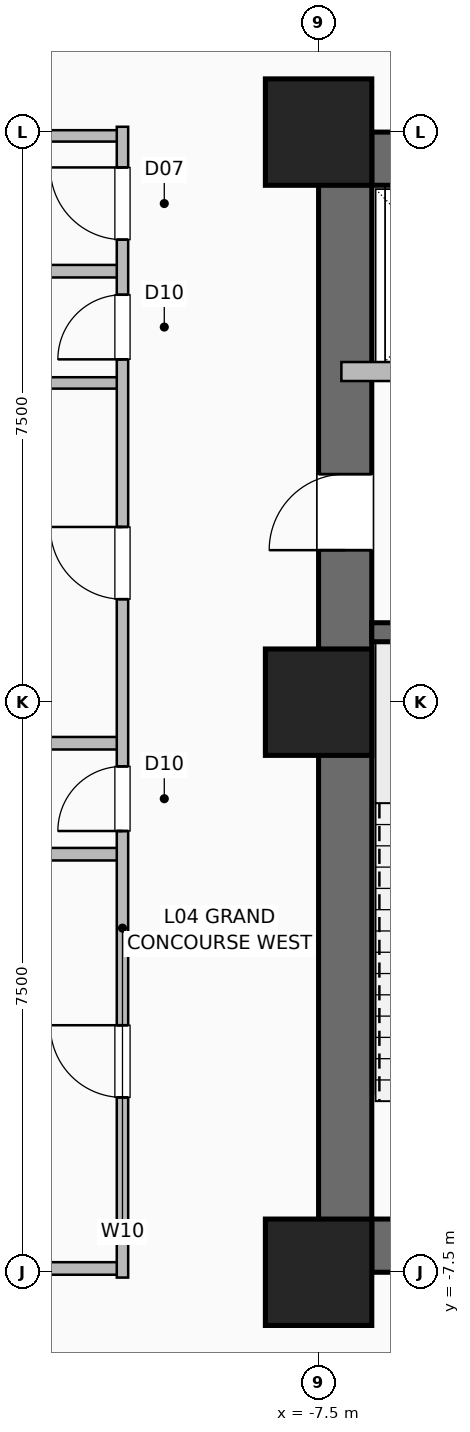
"""IFC4 building model, lengths in metres.
Left out: names, types, materials, properties, quantities, classifications, styles, units other than length and angle.
Written with IfcOpenShell. Run it as: python <this file> out.ifc"""

import sys

from ifc_helpers import new_model, si_unit, direction, frame, frame_2d, origin, origin_2d, place, context, subcontext, project, spatial, rectangle, hollow_rectangle, extrude, element, fill, save


model = new_model("IFC4")
c1 = context("Model", 3, precision=1e-05, world=origin(), true_north=direction((0.0, 1.0)))
c2 = subcontext(c1, "Body", "Model", "MODEL_VIEW")
j1 = project(units=[si_unit("LENGTHUNIT", "METRE"), si_unit("PLANEANGLEUNIT", "RADIAN")], contexts=[c1])
p1 = place(None, origin())
s1 = spatial("IfcSite", under=j1, at=p1, CompositionType="ELEMENT")
p2 = place(p1, origin())
s2 = spatial("IfcBuilding", under=s1, at=p2, CompositionType="ELEMENT")
p3 = place(p2, frame((0.0, 0.0, 21.6)))
s3 = spatial("IfcBuildingStorey", under=s2, at=p3, CompositionType="ELEMENT", Elevation=21.6)
for number, where, z_axis, x_axis in (
    (1, (-7.5, -7.5, 0.0), (0.0, 0.0, 1.0), (1.0, 0.0, 0.0)),
    (2, (-7.5, 7.5, 0.0), (0.0, 0.0, 1.0), (1.0, 0.0, 0.0)),
    (3, (-7.5, 0.0, 0.0), (0.0, 0.0, 1.0), (1.0, 0.0, 0.0)),
):
    element("IfcColumn", number, at=place(p3, frame(where, z_axis=z_axis, x_axis=x_axis)), inside=s3, PredefinedType="COLUMN", context=c2, shape_type="SweptSolid", body=[
        extrude(hollow_rectangle(XDim=1.4, YDim=1.4, WallThickness=0.06, at=origin_2d()), origin(), (0.0, 0.0, 1.0), 5.4),
    ])
p4 = place(p3, frame((-7.5, -7.15, 0.0), z_axis=(0.0, 0.0, 1.0), x_axis=(1.0, 0.0, 0.0)))
e4 = element("IfcWall", 4, at=p4, inside=s3, PredefinedType="SHEAR", context=c2, shape_type="SweptSolid", body=[
    extrude(rectangle(XDim=15.0, YDim=0.7, at=frame_2d((7.5, 0.0))), origin(), (0.0, 0.0, 1.0), 5.0),
])
p5 = place(p4, frame((1.55, 0.0, 0.0)))
e5 = element("IfcOpeningElement", 5, at=p5, cuts=e4, PredefinedType="OPENING", context=c2, shape_type="SweptSolid", body=[
    extrude(rectangle(XDim=1.05, YDim=2.08, at=frame_2d((0.525, 1.04))), frame((0.0, 0.36, 0.0), z_axis=(0.0, -1.0, 0.0), x_axis=(1.0, 0.0, 0.0)), (0.0, 0.0, 1.0), 0.72),
])
p6 = place(p4, frame((12.4, 0.0, 0.0)))
e6 = element("IfcOpeningElement", 6, at=p6, cuts=e4, PredefinedType="OPENING", context=c2, shape_type="SweptSolid", body=[
    extrude(rectangle(XDim=1.05, YDim=2.08, at=frame_2d((0.525, 1.04))), frame((0.0, 0.36, 0.0), z_axis=(0.0, -1.0, 0.0), x_axis=(1.0, 0.0, 0.0)), (0.0, 0.0, 1.0), 0.72),
])
p7 = place(p4, frame((4.64, 0.0, 0.0)))
e7 = element("IfcOpeningElement", 7, at=p7, cuts=e4, PredefinedType="OPENING", context=c2, shape_type="SweptSolid", body=[
    extrude(rectangle(XDim=1.1, YDim=2.2, at=frame_2d((0.55, 1.1))), frame((0.0, 0.36, 0.0), z_axis=(0.0, -1.0, 0.0), x_axis=(1.0, 0.0, 0.0)), (0.0, 0.0, 1.0), 0.72),
])
p8 = place(p4, frame((6.52, 0.0, 0.0)))
e8 = element("IfcOpeningElement", 8, at=p8, cuts=e4, PredefinedType="OPENING", context=c2, shape_type="SweptSolid", body=[
    extrude(rectangle(XDim=1.1, YDim=2.2, at=frame_2d((0.55, 1.1))), frame((0.0, 0.36, 0.0), z_axis=(0.0, -1.0, 0.0), x_axis=(1.0, 0.0, 0.0)), (0.0, 0.0, 1.0), 0.72),
])
p9 = place(p4, frame((8.4, 0.0, 0.0)))
e9 = element("IfcOpeningElement", 9, at=p9, cuts=e4, PredefinedType="OPENING", context=c2, shape_type="SweptSolid", body=[
    extrude(rectangle(XDim=1.1, YDim=2.2, at=frame_2d((0.55, 1.1))), frame((0.0, 0.36, 0.0), z_axis=(0.0, -1.0, 0.0), x_axis=(1.0, 0.0, 0.0)), (0.0, 0.0, 1.0), 0.72),
])
p10 = place(p3, frame((-7.5, 7.15, 0.0), z_axis=(0.0, 0.0, 1.0), x_axis=(1.0, 0.0, 0.0)))
e10 = element("IfcWall", 10, at=p10, inside=s3, PredefinedType="SHEAR", context=c2, shape_type="SweptSolid", body=[
    extrude(rectangle(XDim=15.0, YDim=0.7, at=frame_2d((7.5, 0.0))), origin(), (0.0, 0.0, 1.0), 5.0),
])
p11 = place(p3, frame((-7.15, -7.5, 0.0), z_axis=(0.0, 0.0, 1.0), x_axis=(0.0, 1.0, 0.0)))
e11 = element("IfcWall", 11, at=p11, inside=s3, PredefinedType="SHEAR", context=c2, shape_type="SweptSolid", body=[
    extrude(rectangle(XDim=15.0, YDim=0.7, at=frame_2d((7.5, 0.0))), origin(), (0.0, 0.0, 1.0), 5.0),
])
p12 = place(p11, frame((9.5, 0.0, 0.0)))
e12 = element("IfcOpeningElement", 12, at=p12, cuts=e11, PredefinedType="OPENING", context=c2, shape_type="SweptSolid", body=[
    extrude(rectangle(XDim=1.0, YDim=2.08, at=frame_2d((0.5, 1.04))), frame((0.0, 0.36, 0.0), z_axis=(0.0, -1.0, 0.0), x_axis=(1.0, 0.0, 0.0)), (0.0, 0.0, 1.0), 0.72),
])
p13 = place(p3, frame((-6.8, 0.92, 0.0), z_axis=(0.0, 0.0, 1.0), x_axis=(1.0, 0.0, 0.0)))
e13 = element("IfcWall", 13, at=p13, inside=s3, PredefinedType="SHEAR", context=c2, shape_type="SweptSolid", body=[
    extrude(rectangle(XDim=3.33, YDim=0.25, at=frame_2d((1.665, 0.0))), origin(), (0.0, 0.0, 1.0), 5.0),
])
p14 = place(p3, frame((-7.2, 4.35, 0.0), z_axis=(0.0, 0.0, 1.0), x_axis=(1.0, 0.0, 0.0)))
e14 = element("IfcWall", 14, at=p14, inside=s3, PredefinedType="SHEAR", context=c2, shape_type="SweptSolid", body=[
    extrude(rectangle(XDim=2.7, YDim=0.25, at=frame_2d((1.35, 0.0))), origin(), (0.0, 0.0, 1.0), 5.0),
])
p15 = place(p14, frame((0.75, 0.0, 0.0)))
e15 = element("IfcOpeningElement", 15, at=p15, cuts=e14, PredefinedType="OPENING", context=c2, shape_type="SweptSolid", body=[
    extrude(rectangle(XDim=1.2, YDim=2.2, at=frame_2d((0.6, 1.1))), frame((0.0, 0.135, 0.0), z_axis=(0.0, -1.0, 0.0), x_axis=(1.0, 0.0, 0.0)), (0.0, 0.0, 1.0), 0.27),
])
for number, where, z_axis, x_axis in (
    (16, (-22.25, -0.54, 0.0), (0.0, 0.0, 1.0), (1.0, 0.0, 0.0)),
    (17, (-22.25, 5.67, 0.0), (0.0, 0.0, 1.0), (1.0, 0.0, 0.0)),
    (18, (-22.25, -7.45, 0.0), (0.0, 0.0, 1.0), (1.0, 0.0, 0.0)),
    (19, (-22.25, -2.0, 0.0), (0.0, 0.0, 1.0), (1.0, 0.0, 0.0)),
):
    element("IfcWall", number, at=place(p3, frame(where, z_axis=z_axis, x_axis=x_axis)), inside=s3, PredefinedType="PLUMBINGWALL", context=c2, shape_type="SweptSolid", body=[
        extrude(rectangle(XDim=12.17, YDim=0.165, at=frame_2d((6.085, 0.0))), origin(), (0.0, 0.0, 1.0), 5.0),
    ])
p16 = place(p3, frame((-22.25, 4.2, 0.0), z_axis=(0.0, 0.0, 1.0), x_axis=(1.0, 0.0, 0.0)))
e20 = element("IfcWall", 20, at=p16, inside=s3, PredefinedType="PARTITIONING", context=c2, shape_type="SweptSolid", body=[
    extrude(rectangle(XDim=12.17, YDim=0.15, at=frame_2d((6.085, 0.0))), origin(), (0.0, 0.0, 1.0), 3.375),
])
p17 = place(p3, frame((-22.25, 7.45, 0.0), z_axis=(0.0, 0.0, 1.0), x_axis=(1.0, 0.0, 0.0)))
e21 = element("IfcWall", 21, at=p17, inside=s3, PredefinedType="PARTITIONING", context=c2, shape_type="SweptSolid", body=[
    extrude(rectangle(XDim=12.17, YDim=0.15, at=frame_2d((6.085, 0.0))), origin(), (0.0, 0.0, 1.0), 5.0),
])
p18 = place(p3, frame((-10.08, -7.57, 0.0), z_axis=(0.0, 0.0, 1.0), x_axis=(0.0, 1.0, 0.0)))
e22 = element("IfcWall", 22, at=p18, inside=s3, PredefinedType="PARTITIONING", context=c2, shape_type="SweptSolid", body=[
    extrude(rectangle(XDim=15.14, YDim=0.15, at=frame_2d((7.57, 0.0))), origin(), (0.0, 0.0, 1.0), 5.0),
])
p19 = place(p18, frame((2.37, 0.0, 0.0)))
e23 = element("IfcOpeningElement", 23, at=p19, cuts=e22, PredefinedType="OPENING", context=c2, shape_type="SweptSolid", body=[
    extrude(rectangle(XDim=0.95, YDim=2.06, at=frame_2d((0.475, 1.03))), frame((0.0, 0.085, 0.0), z_axis=(0.0, -1.0, 0.0), x_axis=(1.0, 0.0, 0.0)), (0.0, 0.0, 1.0), 0.17),
])
p20 = place(p18, frame((5.875, 0.0, 0.0)))
e24 = element("IfcOpeningElement", 24, at=p20, cuts=e22, PredefinedType="OPENING", context=c2, shape_type="SweptSolid", body=[
    extrude(rectangle(XDim=0.85, YDim=2.05, at=frame_2d((0.425, 1.025))), frame((0.0, 0.085, 0.0), z_axis=(0.0, -1.0, 0.0), x_axis=(1.0, 0.0, 0.0)), (0.0, 0.0, 1.0), 0.17),
])
p21 = place(p18, frame((8.925, 0.0, 0.0)))
e25 = element("IfcOpeningElement", 25, at=p21, cuts=e22, PredefinedType="OPENING", context=c2, shape_type="SweptSolid", body=[
    extrude(rectangle(XDim=0.95, YDim=2.06, at=frame_2d((0.475, 1.03))), frame((0.0, 0.085, 0.0), z_axis=(0.0, -1.0, 0.0), x_axis=(1.0, 0.0, 0.0)), (0.0, 0.0, 1.0), 0.17),
])
p22 = place(p18, frame((12.08, 0.0, 0.0)))
e26 = element("IfcOpeningElement", 26, at=p22, cuts=e22, PredefinedType="OPENING", context=c2, shape_type="SweptSolid", body=[
    extrude(rectangle(XDim=0.85, YDim=2.05, at=frame_2d((0.425, 1.025))), frame((0.0, 0.085, 0.0), z_axis=(0.0, -1.0, 0.0), x_axis=(1.0, 0.0, 0.0)), (0.0, 0.0, 1.0), 0.17),
])
p23 = place(p18, frame((13.655, 0.0, 0.0)))
e27 = element("IfcOpeningElement", 27, at=p23, cuts=e22, PredefinedType="OPENING", context=c2, shape_type="SweptSolid", body=[
    extrude(rectangle(XDim=0.95, YDim=2.06, at=frame_2d((0.475, 1.03))), frame((0.0, 0.085, 0.0), z_axis=(0.0, -1.0, 0.0), x_axis=(1.0, 0.0, 0.0)), (0.0, 0.0, 1.0), 0.17),
])
p24 = place(p12, origin())
e28 = element("IfcDoor", 28, at=p24, inside=s3, OperationType="SINGLE_SWING_LEFT", PredefinedType="DOOR", context=c2, shape_type="SweptSolid", body=[
    extrude(rectangle(XDim=1.0, YDim=2.08, at=frame_2d((0.5, 1.04))), frame((0.0, 0.025, 0.0), z_axis=(0.0, -1.0, 0.0), x_axis=(1.0, 0.0, 0.0)), (0.0, 0.0, 1.0), 0.05),
])
fill(e12, e28)
p25 = place(p19, origin())
e29 = element("IfcDoor", 29, at=p25, inside=s3, OperationType="SINGLE_SWING_RIGHT", PredefinedType="DOOR", context=c2, shape_type="SweptSolid", body=[
    extrude(rectangle(XDim=0.95, YDim=2.06, at=frame_2d((0.475, 1.03))), frame((0.0, 0.025, 0.0), z_axis=(0.0, -1.0, 0.0), x_axis=(1.0, 0.0, 0.0)), (0.0, 0.0, 1.0), 0.05),
])
fill(e23, e29)
p26 = place(p20, origin())
e30 = element("IfcDoor", 30, at=p26, inside=s3, OperationType="SINGLE_SWING_LEFT", PredefinedType="DOOR", context=c2, shape_type="SweptSolid", body=[
    extrude(rectangle(XDim=0.85, YDim=2.05, at=frame_2d((0.425, 1.025))), frame((0.0, 0.025, 0.0), z_axis=(0.0, -1.0, 0.0), x_axis=(1.0, 0.0, 0.0)), (0.0, 0.0, 1.0), 0.05),
])
fill(e24, e30)
p27 = place(p21, origin())
e31 = element("IfcDoor", 31, at=p27, inside=s3, OperationType="SINGLE_SWING_RIGHT", PredefinedType="DOOR", context=c2, shape_type="SweptSolid", body=[
    extrude(rectangle(XDim=0.95, YDim=2.06, at=frame_2d((0.475, 1.03))), frame((0.0, 0.025, 0.0), z_axis=(0.0, -1.0, 0.0), x_axis=(1.0, 0.0, 0.0)), (0.0, 0.0, 1.0), 0.05),
])
fill(e25, e31)
p28 = place(p22, origin())
e32 = element("IfcDoor", 32, at=p28, inside=s3, OperationType="SINGLE_SWING_LEFT", PredefinedType="DOOR", context=c2, shape_type="SweptSolid", body=[
    extrude(rectangle(XDim=0.85, YDim=2.05, at=frame_2d((0.425, 1.025))), frame((0.0, 0.025, 0.0), z_axis=(0.0, -1.0, 0.0), x_axis=(1.0, 0.0, 0.0)), (0.0, 0.0, 1.0), 0.05),
])
fill(e26, e32)
p29 = place(p23, origin())
e33 = element("IfcDoor", 33, at=p29, inside=s3, OperationType="SINGLE_SWING_RIGHT", PredefinedType="DOOR", context=c2, shape_type="SweptSolid", body=[
    extrude(rectangle(XDim=0.95, YDim=2.06, at=frame_2d((0.475, 1.03))), frame((0.0, 0.025, 0.0), z_axis=(0.0, -1.0, 0.0), x_axis=(1.0, 0.0, 0.0)), (0.0, 0.0, 1.0), 0.05),
])
fill(e27, e33)
save(model, sys.argv[1])
